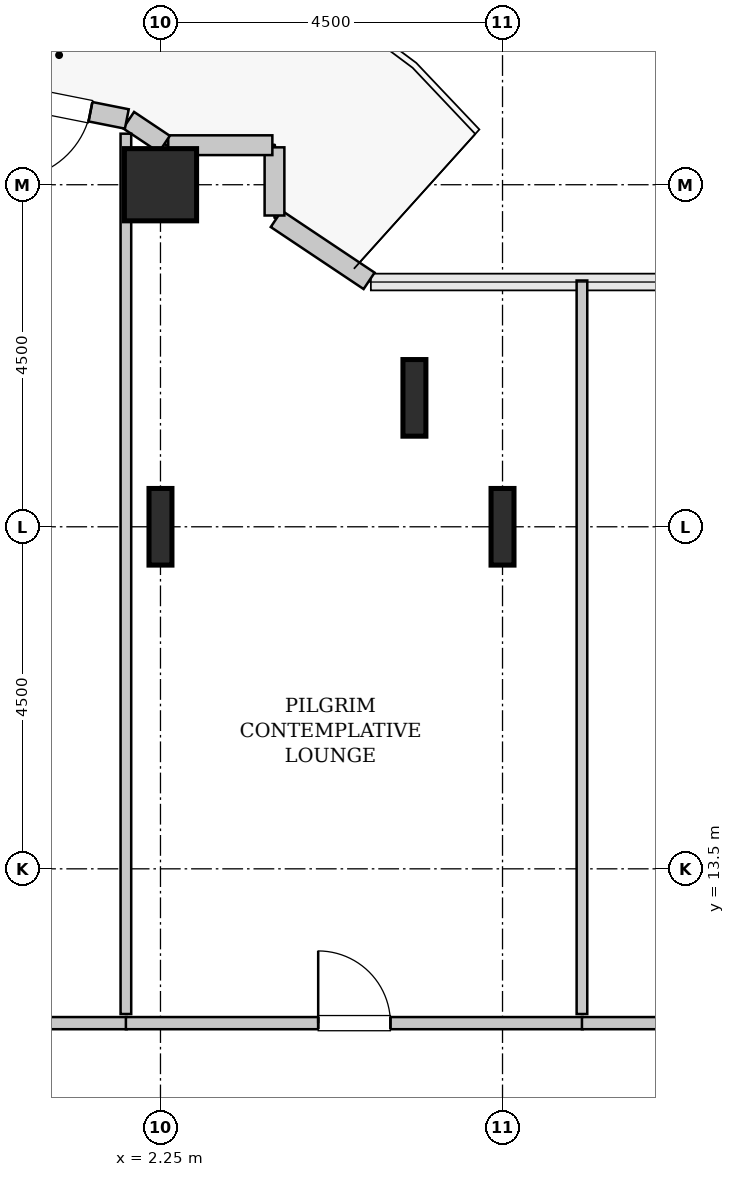
"""IFC4 building model, lengths in metres.
Left out: names, types, materials, properties, quantities, classifications, styles, units other than length and angle.
Written with IfcOpenShell. Run it as: python <this file> out.ifc"""

import sys

from ifc_helpers import new_model, si_unit, direction, frame, frame_2d, origin, origin_2d, place, context, subcontext, project, spatial, rectangle, hollow_rectangle, i_section, extrude, source, transform, mapped, element, fill, save


model = new_model("IFC4")
c1 = context("Model", 3, precision=1e-05, world=origin(), true_north=direction((0.0, 1.0)))
c2 = subcontext(c1, "Body", "Model", "MODEL_VIEW")
j1 = project(units=[si_unit("LENGTHUNIT", "METRE"), si_unit("PLANEANGLEUNIT", "RADIAN")], contexts=[c1])
p1 = place(None, origin())
s1 = spatial("IfcSite", under=j1, at=p1, CompositionType="ELEMENT")
p2 = place(p1, origin())
s2 = spatial("IfcBuilding", under=s1, at=p2, CompositionType="ELEMENT")
p3 = place(p2, frame((0.0, 0.0, 55.8)))
s3 = spatial("IfcBuildingStorey", under=s2, at=p3, CompositionType="ELEMENT", Elevation=55.8)
m1 = source(origin(), c2, "Body", "SweptSolid", [
    extrude(i_section(OverallWidth=0.302, OverallDepth=1.008, WebThickness=0.021, FlangeThickness=0.04, FilletRadius=0.03, at=origin_2d()), origin(), (0.0, 0.0, 1.0), 3.8),
])
p4 = place(p3, frame((2.25, 18.0, 0.0), z_axis=(0.0, 0.0, 1.0), x_axis=(1.0, 0.0, 0.0)))
e1 = element("IfcColumn", 1, at=p4, inside=s3, PredefinedType="COLUMN", context=c2, shape_type="MappedRepresentation", body=[
    mapped(m1, transform((0.0, 0.0, 0.0), x_axis=(1.0, 0.0, 0.0), y_axis=(0.0, 1.0, 0.0), z_axis=(0.0, 0.0, 1.0), scale=1.0)),
])
m2 = source(origin(), c2, "Body", "SweptSolid", [
    extrude(hollow_rectangle(XDim=0.95, YDim=0.95, WallThickness=0.045, InnerFilletRadius=0.045, OuterFilletRadius=0.09, at=origin_2d()), origin(), (0.0, 0.0, 1.0), 3.8),
])
p5 = place(p3, frame((2.25, 22.5, 0.0), z_axis=(0.0, 0.0, 1.0), x_axis=(1.0, 0.0, 0.0)))
e2 = element("IfcColumn", 2, at=p5, inside=s3, PredefinedType="COLUMN", context=c2, shape_type="MappedRepresentation", body=[
    mapped(m2, transform((0.0, 0.0, 0.0), x_axis=(1.0, 0.0, 0.0), y_axis=(0.0, 1.0, 0.0), z_axis=(0.0, 0.0, 1.0), scale=1.0)),
])
for number, where, z_axis, x_axis in (
    (3, (5.591, 19.696, 0.0), (0.0, 0.0, 1.0), (1.0, 0.0, 0.0)),
    (4, (6.75, 18.0, 0.0), (0.0, 0.0, 1.0), (1.0, 0.0, 0.0)),
):
    element("IfcColumn", number, at=place(p3, frame(where, z_axis=z_axis, x_axis=x_axis)), inside=s3, PredefinedType="COLUMN", context=c2, shape_type="MappedRepresentation", body=[
        mapped(m1, transform((0.0, 0.0, 0.0), x_axis=(1.0, 0.0, 0.0), y_axis=(0.0, 1.0, 0.0), z_axis=(0.0, 0.0, 1.0), scale=1.0)),
    ])
m3 = source(origin(), c2, "Body", "SweptSolid", [
    extrude(rectangle(XDim=1.469, YDim=0.26, at=frame_2d((0.734, 0.0))), origin(), (0.0, 0.0, 1.0), 3.55),
])
p6 = place(p3, frame((4.995, 21.236, 0.0), z_axis=(0.0, 0.0, 1.0), x_axis=(-0.831461760506, 0.555581983884, 0.0)))
e5 = element("IfcWall", 5, at=p6, inside=s3, PredefinedType="SOLIDWALL", context=c2, shape_type="MappedRepresentation", body=[
    mapped(m3, transform((0.0, 0.0, 0.0), x_axis=(1.0, 0.0, 0.0), y_axis=(0.0, 1.0, 0.0), z_axis=(0.0, 0.0, 1.0), scale=1.0)),
])
m4 = source(origin(), c2, "Body", "SweptSolid", [
    extrude(rectangle(XDim=0.897, YDim=0.26, at=frame_2d((0.448, 0.0))), origin(), (0.0, 0.0, 1.0), 3.55),
])
p7 = place(p3, frame((3.75, 22.095, 0.0), z_axis=(0.0, 0.0, 1.0), x_axis=(0.0, 1.0, 0.0)))
e6 = element("IfcWall", 6, at=p7, inside=s3, PredefinedType="SOLIDWALL", context=c2, shape_type="MappedRepresentation", body=[
    mapped(m4, transform((0.0, 0.0, 0.0), x_axis=(1.0, 0.0, 0.0), y_axis=(0.0, 1.0, 0.0), z_axis=(0.0, 0.0, 1.0), scale=1.0)),
])
m5 = source(origin(), c2, "Body", "SweptSolid", [
    extrude(rectangle(XDim=1.37, YDim=0.26, at=frame_2d((0.685, 0.0))), origin(), (0.0, 0.0, 1.0), 3.55),
])
p8 = place(p3, frame((3.722, 23.02, 0.0), z_axis=(0.0, 0.0, 1.0), x_axis=(-1.0, 0.0, 0.0)))
e7 = element("IfcWall", 7, at=p8, inside=s3, PredefinedType="SOLIDWALL", context=c2, shape_type="MappedRepresentation", body=[
    mapped(m5, transform((0.0, 0.0, 0.0), x_axis=(1.0, 0.0, 0.0), y_axis=(0.0, 1.0, 0.0), z_axis=(0.0, 0.0, 1.0), scale=1.0)),
])
m6 = source(origin(), c2, "Body", "SweptSolid", [
    extrude(rectangle(XDim=0.565, YDim=0.26, at=frame_2d((0.283, 0.0))), origin(), (0.0, 0.0, 1.0), 3.55),
])
p9 = place(p3, frame((2.301, 23.036, 0.0), z_axis=(0.0, 0.0, 1.0), x_axis=(-0.831651492666, 0.555297933317, 0.0)))
e8 = element("IfcWall", 8, at=p9, inside=s3, PredefinedType="SOLIDWALL", context=c2, shape_type="MappedRepresentation", body=[
    mapped(m6, transform((0.0, 0.0, 0.0), x_axis=(1.0, 0.0, 0.0), y_axis=(0.0, 1.0, 0.0), z_axis=(0.0, 0.0, 1.0), scale=1.0)),
])
m7 = source(origin(), c2, "Body", "SweptSolid", [
    extrude(rectangle(XDim=4.137, YDim=0.26, at=frame_2d((2.068, 0.0))), origin(), (0.0, 0.0, 1.0), 3.55),
])
p10 = place(p3, frame((1.807, 23.365, 0.0), z_axis=(0.0, 0.0, 1.0), x_axis=(-0.980782170794, 0.195105954428, 0.0)))
e9 = element("IfcWall", 9, at=p10, inside=s3, PredefinedType="SOLIDWALL", context=c2, shape_type="MappedRepresentation", body=[
    mapped(m7, transform((0.0, 0.0, 0.0), x_axis=(1.0, 0.0, 0.0), y_axis=(0.0, 1.0, 0.0), z_axis=(0.0, 0.0, 1.0), scale=1.0)),
])
p11 = place(p10, frame((0.488, 0.0, 0.0)))
e10 = element("IfcOpeningElement", 10, at=p11, cuts=e9, PredefinedType="OPENING", context=c2, shape_type="SweptSolid", body=[
    extrude(rectangle(XDim=1.1, YDim=2.2, at=frame_2d((0.55, 1.1))), frame((0.0, 0.14, 0.0), z_axis=(0.0, -1.0, 0.0), x_axis=(1.0, 0.0, 0.0)), (0.0, 0.0, 1.0), 0.28),
])
m8 = source(origin(), c2, "Body", "SweptSolid", [
    extrude(rectangle(XDim=4.605, YDim=0.16, at=frame_2d((2.302, 0.0))), origin(), (0.0, 0.0, 1.0), 3.535),
])
p12 = place(p3, frame((-2.8, 11.47, 0.0), z_axis=(0.0, 0.0, 1.0), x_axis=(1.0, 0.0, 0.0)))
e11 = element("IfcWall", 11, at=p12, inside=s3, PredefinedType="PARTITIONING", context=c2, shape_type="MappedRepresentation", body=[
    mapped(m8, transform((0.0, 0.0, 0.0), x_axis=(1.0, 0.0, 0.0), y_axis=(0.0, 1.0, 0.0), z_axis=(0.0, 0.0, 1.0), scale=1.0)),
])
p13 = place(p12, frame((1.827, 0.0, 0.0)))
e12 = element("IfcOpeningElement", 12, at=p13, cuts=e11, PredefinedType="OPENING", context=c2, shape_type="SweptSolid", body=[
    extrude(rectangle(XDim=0.95, YDim=2.1, at=frame_2d((0.475, 1.05))), frame((0.0, 0.09, 0.0), z_axis=(0.0, -1.0, 0.0), x_axis=(1.0, 0.0, 0.0)), (0.0, 0.0, 1.0), 0.18),
])
m9 = source(origin(), c2, "Body", "SweptSolid", [
    extrude(rectangle(XDim=11.581, YDim=0.14, at=frame_2d((5.791, 0.0))), origin(), (0.0, 0.0, 1.0), 2.825),
])
p14 = place(p3, frame((1.795, 11.59, 0.0), z_axis=(0.0, 0.0, 1.0), x_axis=(0.0, 1.0, 0.0)))
e13 = element("IfcWall", 13, at=p14, inside=s3, PredefinedType="PARTITIONING", context=c2, shape_type="MappedRepresentation", body=[
    mapped(m9, transform((0.0, 0.0, 0.0), x_axis=(1.0, 0.0, 0.0), y_axis=(0.0, 1.0, 0.0), z_axis=(0.0, 0.0, 1.0), scale=1.0)),
])
m10 = source(origin(), c2, "Body", "SweptSolid", [
    extrude(rectangle(XDim=6.01, YDim=0.16, at=frame_2d((3.005, 0.0))), origin(), (0.0, 0.0, 1.0), 3.535),
])
p15 = place(p3, frame((1.795, 11.47, 0.0), z_axis=(0.0, 0.0, 1.0), x_axis=(1.0, 0.0, 0.0)))
e14 = element("IfcWall", 14, at=p15, inside=s3, PredefinedType="PARTITIONING", context=c2, shape_type="MappedRepresentation", body=[
    mapped(m10, transform((0.0, 0.0, 0.0), x_axis=(1.0, 0.0, 0.0), y_axis=(0.0, 1.0, 0.0), z_axis=(0.0, 0.0, 1.0), scale=1.0)),
])
p16 = place(p15, frame((2.53, 0.0, 0.0)))
e15 = element("IfcOpeningElement", 15, at=p16, cuts=e14, PredefinedType="OPENING", context=c2, shape_type="SweptSolid", body=[
    extrude(rectangle(XDim=0.95, YDim=2.1, at=frame_2d((0.475, 1.05))), frame((0.0, 0.09, 0.0), z_axis=(0.0, -1.0, 0.0), x_axis=(1.0, 0.0, 0.0)), (0.0, 0.0, 1.0), 0.18),
])
m11 = source(origin(), c2, "Body", "SweptSolid", [
    extrude(rectangle(XDim=9.65, YDim=0.14, at=frame_2d((4.825, 0.0))), origin(), (0.0, 0.0, 1.0), 3.535),
])
p17 = place(p3, frame((7.795, 11.59, 0.0), z_axis=(0.0, 0.0, 1.0), x_axis=(0.0, 1.0, 0.0)))
e16 = element("IfcWall", 16, at=p17, inside=s3, PredefinedType="PARTITIONING", context=c2, shape_type="MappedRepresentation", body=[
    mapped(m11, transform((0.0, 0.0, 0.0), x_axis=(1.0, 0.0, 0.0), y_axis=(0.0, 1.0, 0.0), z_axis=(0.0, 0.0, 1.0), scale=1.0)),
])
m12 = source(origin(), c2, "Body", "SweptSolid", [
    extrude(rectangle(XDim=5.825, YDim=0.16, at=frame_2d((2.913, 0.0))), origin(), (0.0, 0.0, 1.0), 3.535),
])
p18 = place(p3, frame((7.795, 11.47, 0.0), z_axis=(0.0, 0.0, 1.0), x_axis=(1.0, 0.0, 0.0)))
e17 = element("IfcWall", 17, at=p18, inside=s3, PredefinedType="PARTITIONING", context=c2, shape_type="MappedRepresentation", body=[
    mapped(m12, transform((0.0, 0.0, 0.0), x_axis=(1.0, 0.0, 0.0), y_axis=(0.0, 1.0, 0.0), z_axis=(0.0, 0.0, 1.0), scale=1.0)),
])
p19 = place(p18, frame((2.438, 0.0, 0.0)))
e18 = element("IfcOpeningElement", 18, at=p19, cuts=e17, PredefinedType="OPENING", context=c2, shape_type="SweptSolid", body=[
    extrude(rectangle(XDim=0.95, YDim=2.1, at=frame_2d((0.475, 1.05))), frame((0.0, 0.09, 0.0), z_axis=(0.0, -1.0, 0.0), x_axis=(1.0, 0.0, 0.0)), (0.0, 0.0, 1.0), 0.18),
])
m13 = source(origin(), c2, "Body", "SweptSolid", [
    extrude(rectangle(XDim=1.1, YDim=2.2, at=frame_2d((0.55, 1.1))), frame((0.0, 0.025, 0.0), z_axis=(0.0, -1.0, 0.0), x_axis=(1.0, 0.0, 0.0)), (0.0, 0.0, 1.0), 0.05),
])
p20 = place(p11, origin())
e19 = element("IfcDoor", 19, at=p20, inside=s3, OperationType="SINGLE_SWING_RIGHT", PredefinedType="DOOR", context=c2, shape_type="MappedRepresentation", body=[
    mapped(m13, transform((0.0, 0.0, 0.0), x_axis=(1.0, 0.0, 0.0), y_axis=(0.0, 1.0, 0.0), z_axis=(0.0, 0.0, 1.0), scale=1.0)),
])
fill(e10, e19)
m14 = source(origin(), c2, "Body", "SweptSolid", [
    extrude(rectangle(XDim=0.95, YDim=2.1, at=frame_2d((0.475, 1.05))), frame((0.0, 0.025, 0.0), z_axis=(0.0, -1.0, 0.0), x_axis=(1.0, 0.0, 0.0)), (0.0, 0.0, 1.0), 0.05),
])
p21 = place(p16, origin())
e20 = element("IfcDoor", 20, at=p21, inside=s3, OperationType="SINGLE_SWING_LEFT", PredefinedType="DOOR", context=c2, shape_type="MappedRepresentation", body=[
    mapped(m14, transform((0.0, 0.0, 0.0), x_axis=(1.0, 0.0, 0.0), y_axis=(0.0, 1.0, 0.0), z_axis=(0.0, 0.0, 1.0), scale=1.0)),
])
fill(e15, e20)
save(model, sys.argv[1])
